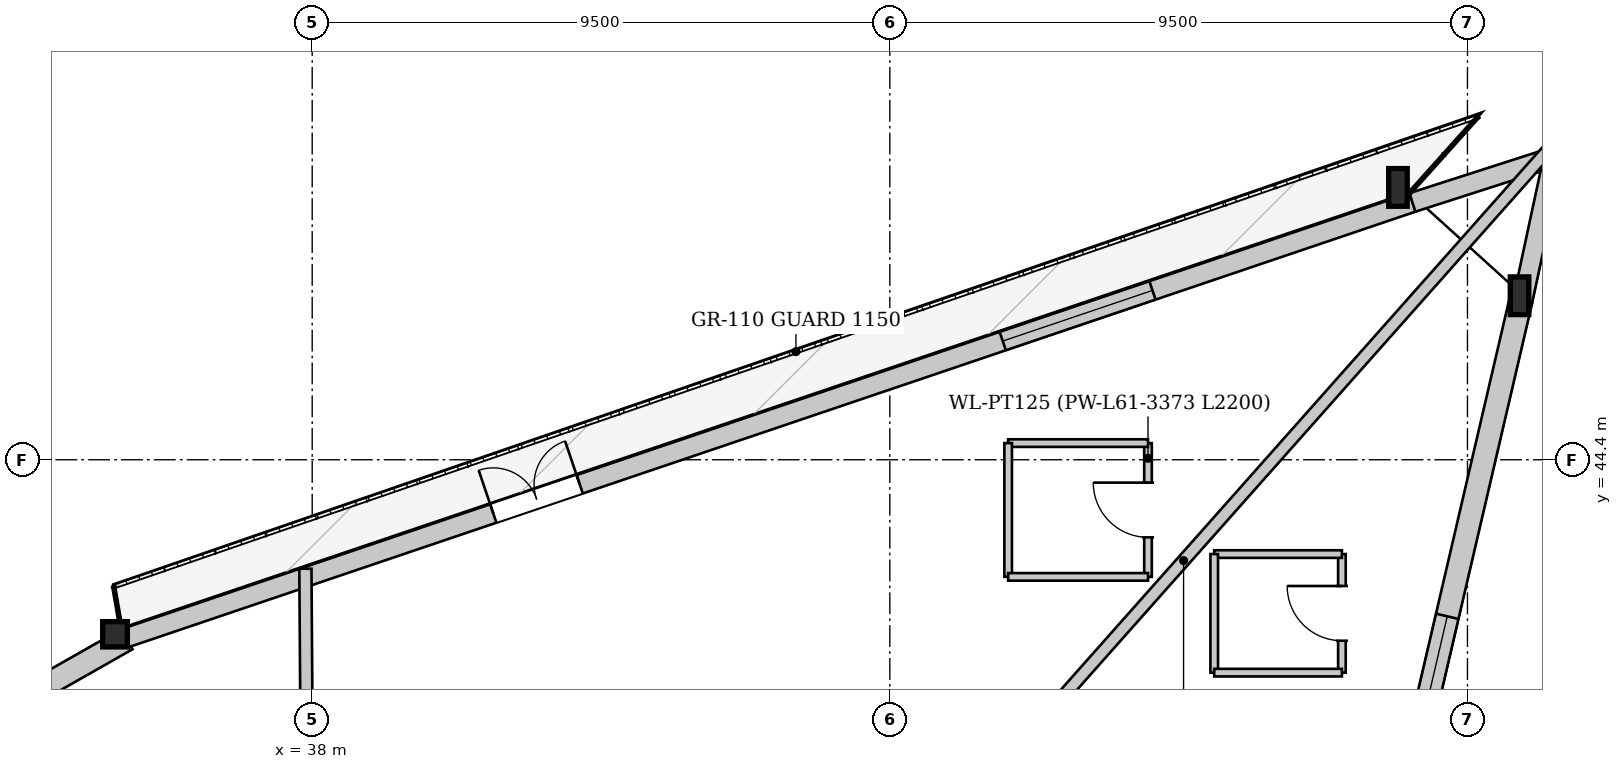
"""IFC4 building model, lengths in metres.
Left out: names, types, materials, properties, quantities, classifications, styles, units other than length and angle.
Written with IfcOpenShell. Run it as: python <this file> out.ifc"""

import sys

from ifc_helpers import new_model, si_unit, direction, frame, frame_2d, origin, origin_2d, place, context, subcontext, project, spatial, rectangle, i_section, extrude, source, transform, mapped, element, fill, save


model = new_model("IFC4")
c1 = context("Model", 3, precision=1e-05, world=origin(), true_north=direction((0.0, 1.0)))
c2 = subcontext(c1, "Body", "Model", "MODEL_VIEW")
j1 = project(units=[si_unit("LENGTHUNIT", "METRE"), si_unit("PLANEANGLEUNIT", "RADIAN")], contexts=[c1])
p1 = place(None, origin())
s1 = spatial("IfcSite", under=j1, at=p1, CompositionType="ELEMENT")
p2 = place(p1, origin())
s2 = spatial("IfcBuilding", under=s1, at=p2, CompositionType="ELEMENT")
p3 = place(p2, frame((0.0, 0.0, 230.9)))
s3 = spatial("IfcBuildingStorey", under=s2, at=p3, CompositionType="ELEMENT", Elevation=230.9)
m1 = source(origin(), c2, "Body", "SweptSolid", [
    extrude(i_section(OverallWidth=0.305, OverallDepth=0.62, WebThickness=0.021, FlangeThickness=0.04, at=origin_2d()), origin(), (0.0, 0.0, 1.0), 3.47),
])
p4 = place(p3, frame((58.06, 46.961, 0.0), z_axis=(-0.117364168692, 0.078313141339, 0.989996315044), x_axis=(-0.555045397528, -0.831820056673, 0.0)))
e1 = element("IfcColumn", 1, at=p4, inside=s3, PredefinedType="COLUMN", context=c2, shape_type="MappedRepresentation", body=[
    mapped(m1, transform((0.0, 0.0, 0.0), x_axis=(1.0, 0.0, 0.0), y_axis=(0.0, 1.0, 0.0), z_axis=(0.0, 0.0, 1.0), scale=1.0)),
])
m2 = source(origin(), c2, "Body", "SweptSolid", [
    extrude(i_section(OverallWidth=0.305, OverallDepth=0.62, WebThickness=0.021, FlangeThickness=0.04, at=origin_2d()), origin(), (0.0, 0.0, 1.0), 3.461),
])
p5 = place(p3, frame((56.046, 48.784, 0.0), z_axis=(-0.109545504942, 0.054808021468, 0.992469577937), x_axis=(-0.447443925033, -0.894311989158, 0.0)))
e2 = element("IfcColumn", 2, at=p5, inside=s3, PredefinedType="COLUMN", context=c2, shape_type="MappedRepresentation", body=[
    mapped(m2, transform((0.0, 0.0, 0.0), x_axis=(1.0, 0.0, 0.0), y_axis=(0.0, 1.0, 0.0), z_axis=(0.0, 0.0, 1.0), scale=1.0)),
])
m3 = source(origin(), c2, "Body", "SweptSolid", [
    extrude(i_section(OverallWidth=0.406, OverallDepth=0.416, WebThickness=0.027, FlangeThickness=0.042, at=origin_2d()), origin(), (0.0, 0.0, 1.0), 3.445),
])
p6 = place(p3, frame((34.857, 41.614, 0.0), z_axis=(-0.058182533366, -0.048827972581, 0.997111138191), x_axis=(0.642841922704, -0.765998865805, 0.0)))
e3 = element("IfcColumn", 3, at=p6, inside=s3, PredefinedType="COLUMN", context=c2, shape_type="MappedRepresentation", body=[
    mapped(m3, transform((0.0, 0.0, 0.0), x_axis=(1.0, 0.0, 0.0), y_axis=(0.0, 1.0, 0.0), z_axis=(0.0, 0.0, 1.0), scale=1.0)),
])
p7 = place(p3, frame((15.504, 30.396, 0.0), z_axis=(0.0, 0.0, 1.0), x_axis=(0.869398698509, 0.494111225365, 0.0)))
e4 = element("IfcWall", 4, at=p7, inside=s3, PredefinedType="SOLIDWALL", context=c2, shape_type="SweptSolid", body=[
    extrude(rectangle(XDim=22.369, YDim=0.38, at=frame_2d((11.185, 0.0))), origin(), (0.0, 0.0, 1.0), 2.872),
])
p8 = place(p7, frame((5.163, 0.0, 0.502)))
e5 = element("IfcOpeningElement", 5, at=p8, cuts=e4, PredefinedType="OPENING", context=c2, shape_type="SweptSolid", body=[
    extrude(rectangle(XDim=2.2, YDim=2.25, at=frame_2d((1.1, 1.125))), frame((0.0, 0.2, 0.0), z_axis=(0.0, -1.0, 0.0), x_axis=(1.0, 0.0, 0.0)), (0.0, 0.0, 1.0), 0.4),
])
p9 = place(p7, frame((15.206, 0.0, 0.502)))
e6 = element("IfcOpeningElement", 6, at=p9, cuts=e4, PredefinedType="OPENING", context=c2, shape_type="SweptSolid", body=[
    extrude(rectangle(XDim=2.2, YDim=2.25, at=frame_2d((1.1, 1.125))), frame((0.0, 0.2, 0.0), z_axis=(0.0, -1.0, 0.0), x_axis=(1.0, 0.0, 0.0)), (0.0, 0.0, 1.0), 0.4),
])
p10 = place(p3, frame((34.909, 41.462, 0.0), z_axis=(0.0, 0.0, 1.0), x_axis=(0.947234987264, 0.320539980193, 0.0)))
e7 = element("IfcWall", 7, at=p10, inside=s3, PredefinedType="SOLIDWALL", context=c2, shape_type="SweptSolid", body=[
    extrude(rectangle(XDim=22.369, YDim=0.32, at=frame_2d((11.185, 0.0))), origin(), (0.0, 0.0, 1.0), 2.872),
])
p11 = place(p10, frame((6.408, 0.0, 0.0)))
e8 = element("IfcOpeningElement", 8, at=p11, cuts=e7, PredefinedType="OPENING", context=c2, shape_type="SweptSolid", body=[
    extrude(rectangle(XDim=1.5, YDim=2.3, at=frame_2d((0.75, 1.15))), frame((0.0, 0.17, 0.0), z_axis=(0.0, -1.0, 0.0), x_axis=(1.0, 0.0, 0.0)), (0.0, 0.0, 1.0), 0.34),
])
p12 = place(p10, frame((15.253, 0.0, 0.402)))
e9 = element("IfcOpeningElement", 9, at=p12, cuts=e7, PredefinedType="OPENING", context=c2, shape_type="SweptSolid", body=[
    extrude(rectangle(XDim=2.6, YDim=2.35, at=frame_2d((1.3, 1.175))), frame((0.0, 0.17, 0.0), z_axis=(0.0, -1.0, 0.0), x_axis=(1.0, 0.0, 0.0)), (0.0, 0.0, 1.0), 0.34),
])
p13 = place(p3, frame((56.095, 48.632, 0.0), z_axis=(0.0, 0.0, 1.0), x_axis=(0.951993925108, 0.306116916483, 0.0)))
e10 = element("IfcWall", 10, at=p13, inside=s3, PredefinedType="SOLIDWALL", context=c2, shape_type="SweptSolid", body=[
    extrude(rectangle(XDim=2.714, YDim=0.32, at=frame_2d((1.357, 0.0))), origin(), (0.0, 0.0, 1.0), 2.872),
])
p14 = place(p3, frame((58.474, 49.649, 0.0), z_axis=(0.0, 0.0, 1.0), x_axis=(-0.210020466506, -0.97769698969, 0.0)))
e11 = element("IfcWall", 11, at=p14, inside=s3, PredefinedType="SOLIDWALL", context=c2, shape_type="SweptSolid", body=[
    extrude(rectangle(XDim=2.714, YDim=0.32, at=frame_2d((1.357, 0.0))), origin(), (0.0, 0.0, 1.0), 2.872),
])
p15 = place(p3, frame((57.875, 47.004, 0.0), z_axis=(0.0, 0.0, 1.0), x_axis=(-0.227070358906, -0.973878355908, 0.0)))
e12 = element("IfcWall", 12, at=p15, inside=s3, PredefinedType="SOLIDWALL", context=c2, shape_type="SweptSolid", body=[
    extrude(rectangle(XDim=22.923, YDim=0.38, at=frame_2d((11.461, 0.0))), origin(), (0.0, 0.0, 1.0), 2.872),
])
p16 = place(p15, frame((5.318, 0.0, 0.502)))
e13 = element("IfcOpeningElement", 13, at=p16, cuts=e12, PredefinedType="OPENING", context=c2, shape_type="SweptSolid", body=[
    extrude(rectangle(XDim=2.2, YDim=2.25, at=frame_2d((1.1, 1.125))), frame((0.0, 0.2, 0.0), z_axis=(0.0, -1.0, 0.0), x_axis=(1.0, 0.0, 0.0)), (0.0, 0.0, 1.0), 0.4),
])
p17 = place(p15, frame((13.804, 0.0, 0.502)))
e14 = element("IfcOpeningElement", 14, at=p17, cuts=e12, PredefinedType="OPENING", context=c2, shape_type="SweptSolid", body=[
    extrude(rectangle(XDim=2.2, YDim=2.25, at=frame_2d((1.1, 1.125))), frame((0.0, 0.2, 0.0), z_axis=(0.0, -1.0, 0.0), x_axis=(1.0, 0.0, 0.0)), (0.0, 0.0, 1.0), 0.4),
])
p18 = place(p3, frame((46.346, 36.0, 0.0), z_axis=(0.0, 0.0, 1.0), x_axis=(0.663932561703, 0.747792453499, 0.0)))
e15 = element("IfcWall", 15, at=p18, inside=s3, PredefinedType="PARTITIONING", context=c2, shape_type="SweptSolid", body=[
    extrude(rectangle(XDim=18.03, YDim=0.2, at=frame_2d((9.015, 0.0))), origin(), (0.0, 0.0, 1.0), 2.975),
])
p19 = place(p3, frame((37.934, 36.0, 0.0), z_axis=(0.0, 0.0, 1.0), x_axis=(-0.006982760372, 0.999975620232, 0.0)))
e16 = element("IfcWall", 16, at=p19, inside=s3, PredefinedType="PARTITIONING", context=c2, shape_type="SweptSolid", body=[
    extrude(rectangle(XDim=6.608, YDim=0.2, at=frame_2d((3.304, 0.0))), origin(), (0.0, 0.0, 1.0), 3.38),
])
p20 = place(p3, frame((51.746, 42.474, 0.0), z_axis=(0.0, 0.0, 1.0), x_axis=(0.0, 1.0, 0.0)))
e17 = element("IfcWall", 17, at=p20, inside=s3, PredefinedType="PARTITIONING", context=c2, shape_type="SweptSolid", body=[
    extrude(rectangle(XDim=2.2, YDim=0.125, at=frame_2d((1.1, 0.0))), origin(), (0.0, 0.0, 1.0), 3.38),
])
p21 = place(p20, frame((0.65, 0.0, 0.0)))
e18 = element("IfcOpeningElement", 18, at=p21, cuts=e17, PredefinedType="OPENING", context=c2, shape_type="SweptSolid", body=[
    extrude(rectangle(XDim=0.9, YDim=2.1, at=frame_2d((0.45, 1.05))), frame((0.0, 0.073, 0.0), z_axis=(0.0, -1.0, 0.0), x_axis=(1.0, 0.0, 0.0)), (0.0, 0.0, 1.0), 0.145),
])
p22 = place(p3, frame((51.746, 44.674, 0.0), z_axis=(0.0, 0.0, 1.0), x_axis=(-1.0, 0.0, 0.0)))
e19 = element("IfcWall", 19, at=p22, inside=s3, PredefinedType="PARTITIONING", context=c2, shape_type="SweptSolid", body=[
    extrude(rectangle(XDim=2.3, YDim=0.125, at=frame_2d((1.15, 0.0))), origin(), (0.0, 0.0, 1.0), 3.38),
])
p23 = place(p3, frame((49.446, 44.674, 0.0), z_axis=(0.0, 0.0, 1.0), x_axis=(0.0, -1.0, 0.0)))
e20 = element("IfcWall", 20, at=p23, inside=s3, PredefinedType="PARTITIONING", context=c2, shape_type="SweptSolid", body=[
    extrude(rectangle(XDim=2.2, YDim=0.125, at=frame_2d((1.1, 0.0))), origin(), (0.0, 0.0, 1.0), 3.38),
])
p24 = place(p3, frame((49.446, 42.474, 0.0), z_axis=(0.0, 0.0, 1.0), x_axis=(1.0, 0.0, 0.0)))
e21 = element("IfcWall", 21, at=p24, inside=s3, PredefinedType="PARTITIONING", context=c2, shape_type="SweptSolid", body=[
    extrude(rectangle(XDim=2.3, YDim=0.125, at=frame_2d((1.15, 0.0))), origin(), (0.0, 0.0, 1.0), 3.065),
])
p25 = place(p3, frame((54.935, 40.899, 0.0), z_axis=(0.0, 0.0, 1.0), x_axis=(0.0, 1.0, 0.0)))
e22 = element("IfcWall", 22, at=p25, inside=s3, PredefinedType="PARTITIONING", context=c2, shape_type="SweptSolid", body=[
    extrude(rectangle(XDim=1.95, YDim=0.125, at=frame_2d((0.975, 0.0))), origin(), (0.0, 0.0, 1.0), 3.38),
])
p26 = place(p25, frame((0.525, 0.0, 0.0)))
e23 = element("IfcOpeningElement", 23, at=p26, cuts=e22, PredefinedType="OPENING", context=c2, shape_type="SweptSolid", body=[
    extrude(rectangle(XDim=0.9, YDim=2.1, at=frame_2d((0.45, 1.05))), frame((0.0, 0.073, 0.0), z_axis=(0.0, -1.0, 0.0), x_axis=(1.0, 0.0, 0.0)), (0.0, 0.0, 1.0), 0.145),
])
p27 = place(p3, frame((54.935, 42.849, 0.0), z_axis=(0.0, 0.0, 1.0), x_axis=(-1.0, 0.0, 0.0)))
e24 = element("IfcWall", 24, at=p27, inside=s3, PredefinedType="PARTITIONING", context=c2, shape_type="SweptSolid", body=[
    extrude(rectangle(XDim=2.1, YDim=0.125, at=frame_2d((1.05, 0.0))), origin(), (0.0, 0.0, 1.0), 3.38),
])
p28 = place(p3, frame((52.835, 42.849, 0.0), z_axis=(0.0, 0.0, 1.0), x_axis=(0.0, -1.0, 0.0)))
e25 = element("IfcWall", 25, at=p28, inside=s3, PredefinedType="PARTITIONING", context=c2, shape_type="SweptSolid", body=[
    extrude(rectangle(XDim=1.95, YDim=0.125, at=frame_2d((0.975, 0.0))), origin(), (0.0, 0.0, 1.0), 3.38),
])
p29 = place(p3, frame((52.835, 40.899, 0.0), z_axis=(0.0, 0.0, 1.0), x_axis=(1.0, 0.0, 0.0)))
e26 = element("IfcWall", 26, at=p29, inside=s3, PredefinedType="PARTITIONING", context=c2, shape_type="SweptSolid", body=[
    extrude(rectangle(XDim=2.1, YDim=0.125, at=frame_2d((1.05, 0.0))), origin(), (0.0, 0.0, 1.0), 3.38),
])
m4 = source(origin(), c2, "Body", "SweptSolid", [
    extrude(rectangle(XDim=1.5, YDim=2.3, at=frame_2d((0.75, 1.15))), frame((0.0, 0.025, 0.0), z_axis=(0.0, -1.0, 0.0), x_axis=(1.0, 0.0, 0.0)), (0.0, 0.0, 1.0), 0.05),
])
p30 = place(p11, origin())
e27 = element("IfcDoor", 27, at=p30, inside=s3, OperationType="DOUBLE_DOOR_SINGLE_SWING", PredefinedType="DOOR", context=c2, shape_type="MappedRepresentation", body=[
    mapped(m4, transform((0.0, 0.0, 0.0), x_axis=(1.0, 0.0, 0.0), y_axis=(0.0, 1.0, 0.0), z_axis=(0.0, 0.0, 1.0), scale=1.0)),
])
fill(e8, e27)
m5 = source(origin(), c2, "Body", "SweptSolid", [
    extrude(rectangle(XDim=2.6, YDim=2.35, at=frame_2d((1.3, 1.175))), frame((0.0, 0.03, 0.0), z_axis=(0.0, -1.0, 0.0), x_axis=(1.0, 0.0, 0.0)), (0.0, 0.0, 1.0), 0.06),
])
p31 = place(p12, origin())
e28 = element("IfcWindow", 28, at=p31, inside=s3, PartitioningType="SINGLE_PANEL", PredefinedType="WINDOW", context=c2, shape_type="MappedRepresentation", body=[
    mapped(m5, transform((0.0, 0.0, 0.0), x_axis=(1.0, 0.0, 0.0), y_axis=(0.0, 1.0, 0.0), z_axis=(0.0, 0.0, 1.0), scale=1.0)),
])
fill(e9, e28)
m6 = source(origin(), c2, "Body", "SweptSolid", [
    extrude(rectangle(XDim=2.2, YDim=2.25, at=frame_2d((1.1, 1.125))), frame((0.0, 0.03, 0.0), z_axis=(0.0, -1.0, 0.0), x_axis=(1.0, 0.0, 0.0)), (0.0, 0.0, 1.0), 0.06),
])
p32 = place(p16, origin())
e29 = element("IfcWindow", 29, at=p32, inside=s3, PartitioningType="SINGLE_PANEL", PredefinedType="WINDOW", context=c2, shape_type="MappedRepresentation", body=[
    mapped(m6, transform((0.0, 0.0, 0.0), x_axis=(1.0, 0.0, 0.0), y_axis=(0.0, 1.0, 0.0), z_axis=(0.0, 0.0, 1.0), scale=1.0)),
])
fill(e13, e29)
m7 = source(origin(), c2, "Body", "SweptSolid", [
    extrude(rectangle(XDim=0.9, YDim=2.1, at=frame_2d((0.45, 1.05))), frame((0.0, 0.025, 0.0), z_axis=(0.0, -1.0, 0.0), x_axis=(1.0, 0.0, 0.0)), (0.0, 0.0, 1.0), 0.05),
])
p33 = place(p21, origin())
e30 = element("IfcDoor", 30, at=p33, inside=s3, OperationType="SINGLE_SWING_RIGHT", PredefinedType="DOOR", context=c2, shape_type="MappedRepresentation", body=[
    mapped(m7, transform((0.0, 0.0, 0.0), x_axis=(1.0, 0.0, 0.0), y_axis=(0.0, 1.0, 0.0), z_axis=(0.0, 0.0, 1.0), scale=1.0)),
])
fill(e18, e30)
p34 = place(p26, origin())
e31 = element("IfcDoor", 31, at=p34, inside=s3, OperationType="SINGLE_SWING_RIGHT", PredefinedType="DOOR", context=c2, shape_type="MappedRepresentation", body=[
    mapped(m7, transform((0.0, 0.0, 0.0), x_axis=(1.0, 0.0, 0.0), y_axis=(0.0, 1.0, 0.0), z_axis=(0.0, 0.0, 1.0), scale=1.0)),
])
fill(e23, e31)
save(model, sys.argv[1])
